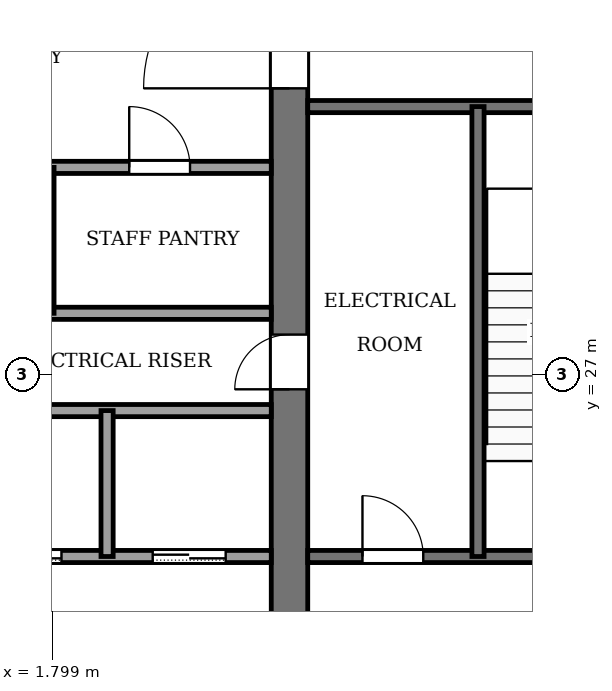
"""IFC4 building model, lengths in metres.
Left out: names, types, materials, properties, quantities, classifications, styles, units other than length and angle.
Written with IfcOpenShell. Run it as: python <this file> out.ifc"""

import sys

from ifc_helpers import new_model, si_unit, direction, frame, frame_2d, origin, place, context, subcontext, project, spatial, rectangle, extrude, element, fill, save


model = new_model("IFC4")
c1 = context("Model", 3, precision=1e-05, world=origin(), true_north=direction((0.0, 1.0)))
c2 = subcontext(c1, "Body", "Model", "MODEL_VIEW")
j1 = project(units=[si_unit("LENGTHUNIT", "METRE"), si_unit("PLANEANGLEUNIT", "RADIAN")], contexts=[c1])
p1 = place(None, origin())
s1 = spatial("IfcSite", under=j1, at=p1, CompositionType="ELEMENT")
p2 = place(p1, origin())
s2 = spatial("IfcBuilding", under=s1, at=p2, CompositionType="ELEMENT")
p3 = place(p2, frame((0.0, 0.0, 186.0)))
s3 = spatial("IfcBuildingStorey", under=s2, at=p3, CompositionType="ELEMENT", Elevation=186.0)
p4 = place(p3, frame((5.7, 18.4, -0.13), z_axis=(0.0, 0.0, 1.0), x_axis=(0.0, 1.0, 0.0)))
e1 = element("IfcWall", 1, at=p4, inside=s3, PredefinedType="SHEAR", context=c2, shape_type="SweptSolid", body=[
    extrude(rectangle(XDim=19.2, YDim=0.6, at=frame_2d((9.6, 0.0))), origin(), (0.0, 0.0, 1.0), 4.0),
])
p5 = place(p4, frame((8.35, 0.0, 0.13)))
e2 = element("IfcOpeningElement", 2, at=p5, cuts=e1, PredefinedType="OPENING", context=c2, shape_type="SweptSolid", body=[
    extrude(rectangle(XDim=0.9, YDim=2.1, at=frame_2d((0.45, 1.05))), frame((0.0, 0.31, 0.0), z_axis=(0.0, -1.0, 0.0), x_axis=(1.0, 0.0, 0.0)), (0.0, 0.0, 1.0), 0.62),
])
p6 = place(p4, frame((13.3, 0.0, 0.13)))
e3 = element("IfcOpeningElement", 3, at=p6, cuts=e1, PredefinedType="OPENING", context=c2, shape_type="SweptSolid", body=[
    extrude(rectangle(XDim=2.4, YDim=2.4, at=frame_2d((1.2, 1.2))), frame((0.0, 0.31, 0.0), z_axis=(0.0, -1.0, 0.0), x_axis=(1.0, 0.0, 0.0)), (0.0, 0.0, 1.0), 0.62),
])
p7 = place(p3, frame((-5.4, 24.0, 0.0), z_axis=(0.0, 0.0, 1.0), x_axis=(1.0, 0.0, 0.0)))
e4 = element("IfcWall", 4, at=p7, inside=s3, PredefinedType="PARTITIONING", context=c2, shape_type="SweptSolid", body=[
    extrude(rectangle(XDim=10.8, YDim=0.2, at=frame_2d((5.4, 0.0))), origin(), (0.0, 0.0, 1.0), 3.87),
])
p8 = place(p7, frame((0.75, 0.0, 0.0)))
e5 = element("IfcOpeningElement", 5, at=p8, cuts=e4, PredefinedType="OPENING", context=c2, shape_type="SweptSolid", body=[
    extrude(rectangle(XDim=1.2, YDim=2.2, at=frame_2d((0.6, 1.1))), frame((0.0, 0.11, 0.0), z_axis=(0.0, -1.0, 0.0), x_axis=(1.0, 0.0, 0.0)), (0.0, 0.0, 1.0), 0.22),
])
p9 = place(p7, frame((3.45, 0.0, 0.0)))
e6 = element("IfcOpeningElement", 6, at=p9, cuts=e4, PredefinedType="OPENING", context=c2, shape_type="SweptSolid", body=[
    extrude(rectangle(XDim=1.2, YDim=2.2, at=frame_2d((0.6, 1.1))), frame((0.0, 0.11, 0.0), z_axis=(0.0, -1.0, 0.0), x_axis=(1.0, 0.0, 0.0)), (0.0, 0.0, 1.0), 0.22),
])
p10 = place(p7, frame((6.15, 0.0, 0.0)))
e7 = element("IfcOpeningElement", 7, at=p10, cuts=e4, PredefinedType="OPENING", context=c2, shape_type="SweptSolid", body=[
    extrude(rectangle(XDim=1.2, YDim=2.2, at=frame_2d((0.6, 1.1))), frame((0.0, 0.11, 0.0), z_axis=(0.0, -1.0, 0.0), x_axis=(1.0, 0.0, 0.0)), (0.0, 0.0, 1.0), 0.22),
])
p11 = place(p7, frame((8.85, 0.0, 0.0)))
e8 = element("IfcOpeningElement", 8, at=p11, cuts=e4, PredefinedType="OPENING", context=c2, shape_type="SweptSolid", body=[
    extrude(rectangle(XDim=1.2, YDim=2.2, at=frame_2d((0.6, 1.1))), frame((0.0, 0.11, 0.0), z_axis=(0.0, -1.0, 0.0), x_axis=(1.0, 0.0, 0.0)), (0.0, 0.0, 1.0), 0.22),
])
p12 = place(p3, frame((6.0, 24.0, 0.0), z_axis=(0.0, 0.0, 1.0), x_axis=(1.0, 0.0, 0.0)))
e9 = element("IfcWall", 9, at=p12, inside=s3, PredefinedType="PARTITIONING", context=c2, shape_type="SweptSolid", body=[
    extrude(rectangle(XDim=6.6, YDim=0.2, at=frame_2d((3.3, 0.0))), origin(), (0.0, 0.0, 1.0), 3.87),
])
p13 = place(p12, frame((0.9, 0.0, 0.0)))
e10 = element("IfcOpeningElement", 10, at=p13, cuts=e9, PredefinedType="OPENING", context=c2, shape_type="SweptSolid", body=[
    extrude(rectangle(XDim=1.0, YDim=2.1, at=frame_2d((0.5, 1.05))), frame((0.0, 0.11, 0.0), z_axis=(0.0, -1.0, 0.0), x_axis=(1.0, 0.0, 0.0)), (0.0, 0.0, 1.0), 0.22),
])
p14 = place(p12, frame((4.4, 0.0, 0.0)))
e11 = element("IfcOpeningElement", 11, at=p14, cuts=e9, PredefinedType="OPENING", context=c2, shape_type="SweptSolid", body=[
    extrude(rectangle(XDim=1.2, YDim=2.2, at=frame_2d((0.6, 1.1))), frame((0.0, 0.11, 0.0), z_axis=(0.0, -1.0, 0.0), x_axis=(1.0, 0.0, 0.0)), (0.0, 0.0, 1.0), 0.22),
])
for number, where, z_axis, x_axis in (
    (12, (-5.4, 26.4, 0.0), (0.0, 0.0, 1.0), (1.0, 0.0, 0.0)),
    (13, (-5.4, 28.0, 0.0), (0.0, 0.0, 1.0), (1.0, 0.0, 0.0)),
):
    element("IfcWall", number, at=place(p3, frame(where, z_axis=z_axis, x_axis=x_axis)), inside=s3, PredefinedType="PARTITIONING", context=c2, shape_type="SweptSolid", body=[
        extrude(rectangle(XDim=10.8, YDim=0.2, at=frame_2d((5.4, 0.0))), origin(), (0.0, 0.0, 1.0), 3.87),
    ])
p15 = place(p3, frame((-5.4, 30.4, 0.0), z_axis=(0.0, 0.0, 1.0), x_axis=(1.0, 0.0, 0.0)))
e14 = element("IfcWall", 14, at=p15, inside=s3, PredefinedType="PARTITIONING", context=c2, shape_type="SweptSolid", body=[
    extrude(rectangle(XDim=10.8, YDim=0.2, at=frame_2d((5.4, 0.0))), origin(), (0.0, 0.0, 1.0), 3.87),
])
p16 = place(p15, frame((3.064, 0.0, 0.0)))
e15 = element("IfcOpeningElement", 15, at=p16, cuts=e14, PredefinedType="OPENING", context=c2, shape_type="SweptSolid", body=[
    extrude(rectangle(XDim=1.0, YDim=2.1, at=frame_2d((0.5, 1.05))), frame((0.0, 0.11, 0.0), z_axis=(0.0, -1.0, 0.0), x_axis=(1.0, 0.0, 0.0)), (0.0, 0.0, 1.0), 0.22),
])
p17 = place(p15, frame((8.464, 0.0, 0.0)))
e16 = element("IfcOpeningElement", 16, at=p17, cuts=e14, PredefinedType="OPENING", context=c2, shape_type="SweptSolid", body=[
    extrude(rectangle(XDim=1.0, YDim=2.1, at=frame_2d((0.5, 1.05))), frame((0.0, 0.11, 0.0), z_axis=(0.0, -1.0, 0.0), x_axis=(1.0, 0.0, 0.0)), (0.0, 0.0, 1.0), 0.22),
])
p18 = place(p3, frame((6.0, 31.4, 0.0), z_axis=(0.0, 0.0, 1.0), x_axis=(1.0, 0.0, 0.0)))
e17 = element("IfcWall", 17, at=p18, inside=s3, PredefinedType="PARTITIONING", context=c2, shape_type="SweptSolid", body=[
    extrude(rectangle(XDim=6.6, YDim=0.2, at=frame_2d((3.3, 0.0))), origin(), (0.0, 0.0, 1.0), 3.87),
])
for number, where, z_axis, x_axis in (
    (18, (1.728, 28.0, 0.0), (0.0, 0.0, 1.0), (0.0, 1.0, 0.0)),
    (19, (2.7, 24.0, 0.0), (0.0, 0.0, 1.0), (0.0, 1.0, 0.0)),
):
    element("IfcWall", number, at=place(p3, frame(where, z_axis=z_axis, x_axis=x_axis)), inside=s3, PredefinedType="PARTITIONING", context=c2, shape_type="SweptSolid", body=[
        extrude(rectangle(XDim=2.4, YDim=0.2, at=frame_2d((1.2, 0.0))), origin(), (0.0, 0.0, 1.0), 3.87),
    ])
p19 = place(p3, frame((8.8, 24.0, 0.0), z_axis=(0.0, 0.0, 1.0), x_axis=(0.0, 1.0, 0.0)))
e20 = element("IfcWall", 20, at=p19, inside=s3, PredefinedType="PARTITIONING", context=c2, shape_type="SweptSolid", body=[
    extrude(rectangle(XDim=7.4, YDim=0.2, at=frame_2d((3.7, 0.0))), origin(), (0.0, 0.0, 1.0), 3.87),
])
p20 = place(p10, origin())
e21 = element("IfcDoor", 21, at=p20, inside=s3, OperationType="SLIDING_TO_LEFT", PredefinedType="DOOR", context=c2, shape_type="SweptSolid", body=[
    extrude(rectangle(XDim=1.2, YDim=2.2, at=frame_2d((0.6, 1.1))), frame((0.0, 0.025, 0.0), z_axis=(0.0, -1.0, 0.0), x_axis=(1.0, 0.0, 0.0)), (0.0, 0.0, 1.0), 0.05),
])
fill(e7, e21)
p21 = place(p11, origin())
e22 = element("IfcDoor", 22, at=p21, inside=s3, OperationType="SLIDING_TO_LEFT", PredefinedType="DOOR", context=c2, shape_type="SweptSolid", body=[
    extrude(rectangle(XDim=1.2, YDim=2.2, at=frame_2d((0.6, 1.1))), frame((0.0, 0.025, 0.0), z_axis=(0.0, -1.0, 0.0), x_axis=(1.0, 0.0, 0.0)), (0.0, 0.0, 1.0), 0.05),
])
fill(e8, e22)
p22 = place(p17, origin())
e23 = element("IfcDoor", 23, at=p22, inside=s3, OperationType="SINGLE_SWING_LEFT", PredefinedType="DOOR", context=c2, shape_type="SweptSolid", body=[
    extrude(rectangle(XDim=1.0, YDim=2.1, at=frame_2d((0.5, 1.05))), frame((0.0, 0.025, 0.0), z_axis=(0.0, -1.0, 0.0), x_axis=(1.0, 0.0, 0.0)), (0.0, 0.0, 1.0), 0.05),
])
fill(e16, e23)
p23 = place(p13, origin())
e24 = element("IfcDoor", 24, at=p23, inside=s3, OperationType="SINGLE_SWING_RIGHT", PredefinedType="DOOR", context=c2, shape_type="SweptSolid", body=[
    extrude(rectangle(XDim=1.0, YDim=2.1, at=frame_2d((0.5, 1.05))), frame((0.0, 0.025, 0.0), z_axis=(0.0, -1.0, 0.0), x_axis=(1.0, 0.0, 0.0)), (0.0, 0.0, 1.0), 0.05),
])
fill(e10, e24)
p24 = place(p5, origin())
e25 = element("IfcDoor", 25, at=p24, inside=s3, OperationType="SINGLE_SWING_RIGHT", PredefinedType="DOOR", context=c2, shape_type="SweptSolid", body=[
    extrude(rectangle(XDim=0.9, YDim=2.1, at=frame_2d((0.45, 1.05))), frame((0.0, 0.025, 0.0), z_axis=(0.0, -1.0, 0.0), x_axis=(1.0, 0.0, 0.0)), (0.0, 0.0, 1.0), 0.05),
])
fill(e2, e25)
p25 = place(p6, origin())
e26 = element("IfcDoor", 26, at=p25, inside=s3, OperationType="DOUBLE_DOOR_SINGLE_SWING", PredefinedType="DOOR", context=c2, shape_type="SweptSolid", body=[
    extrude(rectangle(XDim=2.4, YDim=2.4, at=frame_2d((1.2, 1.2))), frame((0.0, 0.025, 0.0), z_axis=(0.0, -1.0, 0.0), x_axis=(1.0, 0.0, 0.0)), (0.0, 0.0, 1.0), 0.05),
])
fill(e3, e26)
save(model, sys.argv[1])
